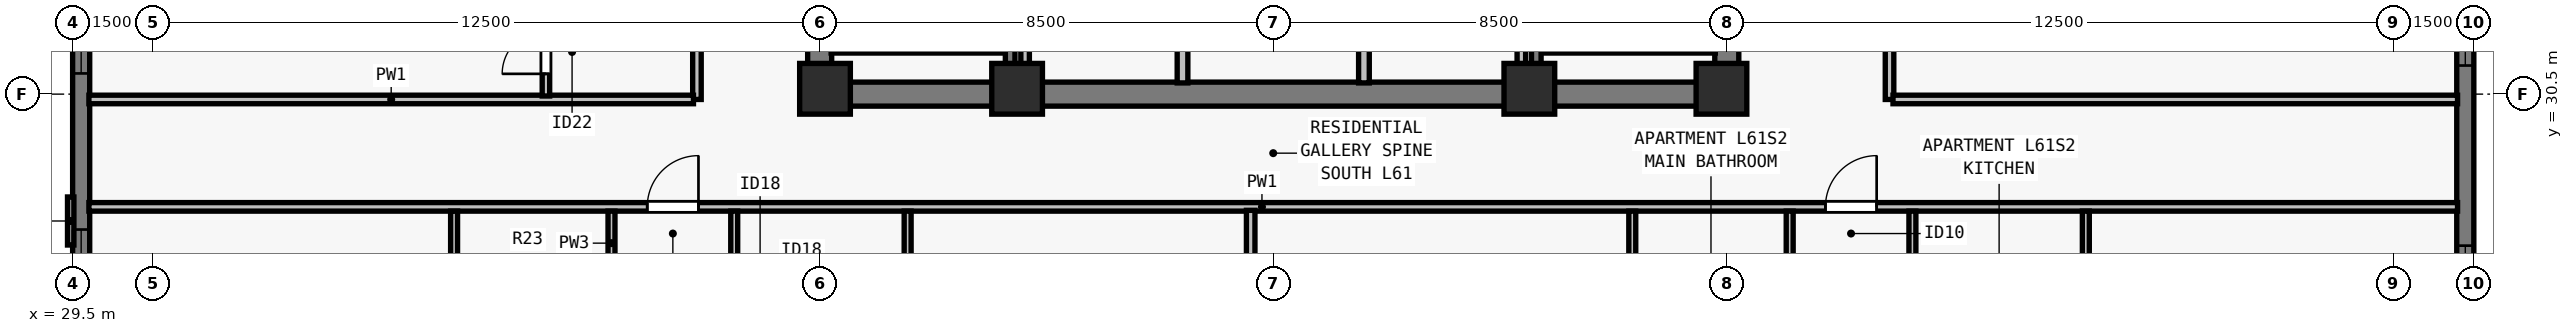
"""IFC4 building model, lengths in metres.
Left out: names, types, materials, properties, quantities, classifications, styles, units other than length and angle.
Written with IfcOpenShell. Run it as: python <this file> out.ifc"""

import sys

from ifc_helpers import new_model, si_unit, direction, frame, frame_2d, origin, origin_2d, place, context, subcontext, project, spatial, rectangle, extrude, element, fill, save


model = new_model("IFC4")
c1 = context("Model", 3, precision=1e-05, world=origin(), true_north=direction((0.0, 1.0)))
c2 = subcontext(c1, "Body", "Model", "MODEL_VIEW")
j1 = project(units=[si_unit("LENGTHUNIT", "METRE"), si_unit("PLANEANGLEUNIT", "RADIAN")], contexts=[c1])
p1 = place(None, origin())
s1 = spatial("IfcSite", under=j1, at=p1, CompositionType="ELEMENT")
p2 = place(p1, origin())
s2 = spatial("IfcBuilding", under=s1, at=p2, CompositionType="ELEMENT")
p3 = place(p2, frame((0.0, 0.0, 223.5)))
s3 = spatial("IfcBuildingStorey", under=s2, at=p3, CompositionType="ELEMENT", Elevation=223.5)
for number, where, z_axis, x_axis in (
    (1, (43.6, 30.6, 0.0), (0.0, 0.0, 1.0), (1.0, 0.0, 0.0)),
    (2, (47.2, 30.6, 0.0), (0.0, 0.0, 1.0), (1.0, 0.0, 0.0)),
    (3, (56.8, 30.6, 0.0), (0.0, 0.0, 1.0), (1.0, 0.0, 0.0)),
    (4, (60.4, 30.6, 0.0), (0.0, 0.0, 1.0), (1.0, 0.0, 0.0)),
):
    element("IfcColumn", number, at=place(p3, frame(where, z_axis=z_axis, x_axis=x_axis)), inside=s3, PredefinedType="COLUMN", context=c2, shape_type="SweptSolid", body=[
        extrude(rectangle(XDim=0.95, YDim=0.95, at=origin_2d()), origin(), (0.0, 0.0, 1.0), 3.5),
    ])
p4 = place(p3, frame((74.34, 56.5, 0.0), z_axis=(0.0, 0.0, 1.0), x_axis=(0.0, -1.0, 0.0)))
e5 = element("IfcWall", 5, at=p4, inside=s3, PredefinedType="SOLIDWALL", context=c2, shape_type="SweptSolid", body=[
    extrude(rectangle(XDim=34.702, YDim=0.32, at=frame_2d((17.351, 0.0))), origin(), (0.0, 0.0, 1.0), 3.29),
])
p5 = place(p4, frame((4.613, 0.0, 0.8)))
e6 = element("IfcOpeningElement", 6, at=p5, cuts=e5, PredefinedType="OPENING", context=c2, shape_type="SweptSolid", body=[
    extrude(rectangle(XDim=1.85, YDim=1.678, at=frame_2d((0.925, 0.839))), frame((0.0, 0.17, 0.0), z_axis=(0.0, -1.0, 0.0), x_axis=(1.0, 0.0, 0.0)), (0.0, 0.0, 1.0), 0.34),
])
p6 = place(p4, frame((9.388, 0.0, 0.8)))
e7 = element("IfcOpeningElement", 7, at=p6, cuts=e5, PredefinedType="OPENING", context=c2, shape_type="SweptSolid", body=[
    extrude(rectangle(XDim=1.55, YDim=1.678, at=frame_2d((0.775, 0.839))), frame((0.0, 0.17, 0.0), z_axis=(0.0, -1.0, 0.0), x_axis=(1.0, 0.0, 0.0)), (0.0, 0.0, 1.0), 0.34),
])
p7 = place(p4, frame((14.888, 0.0, 0.8)))
e8 = element("IfcOpeningElement", 8, at=p7, cuts=e5, PredefinedType="OPENING", context=c2, shape_type="SweptSolid", body=[
    extrude(rectangle(XDim=1.55, YDim=1.678, at=frame_2d((0.775, 0.839))), frame((0.0, 0.17, 0.0), z_axis=(0.0, -1.0, 0.0), x_axis=(1.0, 0.0, 0.0)), (0.0, 0.0, 1.0), 0.34),
])
p8 = place(p4, frame((18.114, 0.0, 0.8)))
e9 = element("IfcOpeningElement", 9, at=p8, cuts=e5, PredefinedType="OPENING", context=c2, shape_type="SweptSolid", body=[
    extrude(rectangle(XDim=1.85, YDim=1.678, at=frame_2d((0.925, 0.839))), frame((0.0, 0.17, 0.0), z_axis=(0.0, -1.0, 0.0), x_axis=(1.0, 0.0, 0.0)), (0.0, 0.0, 1.0), 0.34),
])
p9 = place(p4, frame((23.614, 0.0, 0.8)))
e10 = element("IfcOpeningElement", 10, at=p9, cuts=e5, PredefinedType="OPENING", context=c2, shape_type="SweptSolid", body=[
    extrude(rectangle(XDim=1.85, YDim=1.678, at=frame_2d((0.925, 0.839))), frame((0.0, 0.17, 0.0), z_axis=(0.0, -1.0, 0.0), x_axis=(1.0, 0.0, 0.0)), (0.0, 0.0, 1.0), 0.34),
])
p10 = place(p4, frame((28.839, 0.0, 0.8)))
e11 = element("IfcOpeningElement", 11, at=p10, cuts=e5, PredefinedType="OPENING", context=c2, shape_type="SweptSolid", body=[
    extrude(rectangle(XDim=1.55, YDim=1.678, at=frame_2d((0.775, 0.839))), frame((0.0, 0.17, 0.0), z_axis=(0.0, -1.0, 0.0), x_axis=(1.0, 0.0, 0.0)), (0.0, 0.0, 1.0), 0.34),
])
p11 = place(p4, frame((31.35, 0.0, 0.8)))
e12 = element("IfcOpeningElement", 12, at=p11, cuts=e5, PredefinedType="OPENING", context=c2, shape_type="SweptSolid", body=[
    extrude(rectangle(XDim=0.9, YDim=1.678, at=frame_2d((0.45, 0.839))), frame((0.0, 0.17, 0.0), z_axis=(0.0, -1.0, 0.0), x_axis=(1.0, 0.0, 0.0)), (0.0, 0.0, 1.0), 0.34),
])
p12 = place(p3, frame((29.66, 21.5, 0.0), z_axis=(0.0, 0.0, 1.0), x_axis=(0.0, 1.0, 0.0)))
e13 = element("IfcWall", 13, at=p12, inside=s3, PredefinedType="SOLIDWALL", context=c2, shape_type="SweptSolid", body=[
    extrude(rectangle(XDim=34.702, YDim=0.32, at=frame_2d((17.351, 0.0))), origin(), (0.0, 0.0, 1.0), 3.29),
])
p13 = place(p12, frame((4.613, 0.0, 0.8)))
e14 = element("IfcOpeningElement", 14, at=p13, cuts=e13, PredefinedType="OPENING", context=c2, shape_type="SweptSolid", body=[
    extrude(rectangle(XDim=1.85, YDim=1.678, at=frame_2d((0.925, 0.839))), frame((0.0, 0.17, 0.0), z_axis=(0.0, -1.0, 0.0), x_axis=(1.0, 0.0, 0.0)), (0.0, 0.0, 1.0), 0.34),
])
p14 = place(p12, frame((9.388, 0.0, 0.8)))
e15 = element("IfcOpeningElement", 15, at=p14, cuts=e13, PredefinedType="OPENING", context=c2, shape_type="SweptSolid", body=[
    extrude(rectangle(XDim=1.55, YDim=1.678, at=frame_2d((0.775, 0.839))), frame((0.0, 0.17, 0.0), z_axis=(0.0, -1.0, 0.0), x_axis=(1.0, 0.0, 0.0)), (0.0, 0.0, 1.0), 0.34),
])
p15 = place(p12, frame((14.888, 0.0, 0.8)))
e16 = element("IfcOpeningElement", 16, at=p15, cuts=e13, PredefinedType="OPENING", context=c2, shape_type="SweptSolid", body=[
    extrude(rectangle(XDim=1.55, YDim=1.678, at=frame_2d((0.775, 0.839))), frame((0.0, 0.17, 0.0), z_axis=(0.0, -1.0, 0.0), x_axis=(1.0, 0.0, 0.0)), (0.0, 0.0, 1.0), 0.34),
])
p16 = place(p12, frame((19.364, 0.0, 0.8)))
e17 = element("IfcOpeningElement", 17, at=p16, cuts=e13, PredefinedType="OPENING", context=c2, shape_type="SweptSolid", body=[
    extrude(rectangle(XDim=1.85, YDim=1.678, at=frame_2d((0.925, 0.839))), frame((0.0, 0.17, 0.0), z_axis=(0.0, -1.0, 0.0), x_axis=(1.0, 0.0, 0.0)), (0.0, 0.0, 1.0), 0.34),
])
p17 = place(p12, frame((23.614, 0.0, 0.8)))
e18 = element("IfcOpeningElement", 18, at=p17, cuts=e13, PredefinedType="OPENING", context=c2, shape_type="SweptSolid", body=[
    extrude(rectangle(XDim=1.85, YDim=1.678, at=frame_2d((0.925, 0.839))), frame((0.0, 0.17, 0.0), z_axis=(0.0, -1.0, 0.0), x_axis=(1.0, 0.0, 0.0)), (0.0, 0.0, 1.0), 0.34),
])
p18 = place(p12, frame((28.839, 0.0, 0.8)))
e19 = element("IfcOpeningElement", 19, at=p18, cuts=e13, PredefinedType="OPENING", context=c2, shape_type="SweptSolid", body=[
    extrude(rectangle(XDim=1.55, YDim=1.678, at=frame_2d((0.775, 0.839))), frame((0.0, 0.17, 0.0), z_axis=(0.0, -1.0, 0.0), x_axis=(1.0, 0.0, 0.0)), (0.0, 0.0, 1.0), 0.34),
])
p19 = place(p12, frame((31.35, 0.0, 0.8)))
e20 = element("IfcOpeningElement", 20, at=p19, cuts=e13, PredefinedType="OPENING", context=c2, shape_type="SweptSolid", body=[
    extrude(rectangle(XDim=0.9, YDim=1.678, at=frame_2d((0.45, 0.839))), frame((0.0, 0.17, 0.0), z_axis=(0.0, -1.0, 0.0), x_axis=(1.0, 0.0, 0.0)), (0.0, 0.0, 1.0), 0.34),
])
p20 = place(p3, frame((43.275, 30.5, 0.0), z_axis=(0.0, 0.0, 1.0), x_axis=(1.0, 0.0, 0.0)))
e21 = element("IfcWall", 21, at=p20, inside=s3, PredefinedType="SHEAR", context=c2, shape_type="SweptSolid", body=[
    extrude(rectangle(XDim=17.45, YDim=0.45, at=frame_2d((8.725, 0.0))), origin(), (0.0, 0.0, 1.0), 3.29),
])
for number, where, z_axis, x_axis in (
    (22, (43.5, 30.715, 0.0), (0.0, 0.0, 1.0), (0.0, 1.0, 0.0)),
    (23, (60.5, 30.715, 0.0), (0.0, 0.0, 1.0), (0.0, 1.0, 0.0)),
):
    element("IfcWall", number, at=place(p3, frame(where, z_axis=z_axis, x_axis=x_axis)), inside=s3, PredefinedType="SHEAR", context=c2, shape_type="SweptSolid", body=[
        extrude(rectangle(XDim=8.035, YDim=0.45, at=frame_2d((4.018, 0.0))), origin(), (0.0, 0.0, 1.0), 3.29),
    ])
p21 = place(p3, frame((50.3, 30.71, 0.0), z_axis=(0.0, 0.0, 1.0), x_axis=(0.0, 1.0, 0.0)))
e24 = element("IfcWall", 24, at=p21, inside=s3, PredefinedType="SOLIDWALL", context=c2, shape_type="SweptSolid", body=[
    extrude(rectangle(XDim=7.905, YDim=0.2, at=frame_2d((3.953, 0.0))), origin(), (0.0, 0.0, 1.0), 3.29),
])
p22 = place(p21, frame((3.34, 0.0, 0.0)))
e25 = element("IfcOpeningElement", 25, at=p22, cuts=e24, PredefinedType="OPENING", context=c2, shape_type="SweptSolid", body=[
    extrude(rectangle(XDim=0.9, YDim=2.12, at=frame_2d((0.45, 1.06))), frame((0.0, 0.11, 0.0), z_axis=(0.0, -1.0, 0.0), x_axis=(1.0, 0.0, 0.0)), (0.0, 0.0, 1.0), 0.22),
])
p23 = place(p3, frame((53.7, 30.71, 0.0), z_axis=(0.0, 0.0, 1.0), x_axis=(0.0, 1.0, 0.0)))
e26 = element("IfcWall", 26, at=p23, inside=s3, PredefinedType="SOLIDWALL", context=c2, shape_type="SweptSolid", body=[
    extrude(rectangle(XDim=7.905, YDim=0.2, at=frame_2d((3.953, 0.0))), origin(), (0.0, 0.0, 1.0), 3.29),
])
p24 = place(p23, frame((3.14, 0.0, 0.0)))
e27 = element("IfcOpeningElement", 27, at=p24, cuts=e26, PredefinedType="OPENING", context=c2, shape_type="SweptSolid", body=[
    extrude(rectangle(XDim=0.9, YDim=2.12, at=frame_2d((0.45, 1.06))), frame((0.0, 0.11, 0.0), z_axis=(0.0, -1.0, 0.0), x_axis=(1.0, 0.0, 0.0)), (0.0, 0.0, 1.0), 0.22),
])
for number, where, z_axis, x_axis in (
    (28, (47.35, 30.71, 0.0), (0.0, 0.0, 1.0), (0.0, 1.0, 0.0)),
    (29, (56.65, 30.71, 0.0), (0.0, 0.0, 1.0), (0.0, 1.0, 0.0)),
):
    element("IfcWall", number, at=place(p3, frame(where, z_axis=z_axis, x_axis=x_axis)), inside=s3, PredefinedType="PARTITIONING", context=c2, shape_type="SweptSolid", body=[
        extrude(rectangle(XDim=7.905, YDim=0.16, at=frame_2d((3.953, 0.0))), origin(), (0.0, 0.0, 1.0), 3.29),
    ])
p25 = place(p3, frame((29.805, 28.387, 0.0), z_axis=(0.0, 0.0, 1.0), x_axis=(1.0, 0.0, 0.0)))
e30 = element("IfcWall", 30, at=p25, inside=s3, PredefinedType="PARTITIONING", context=c2, shape_type="SweptSolid", body=[
    extrude(rectangle(XDim=44.39, YDim=0.16, at=frame_2d((22.195, 0.0))), origin(), (0.0, 0.0, 1.0), 2.958),
])
p26 = place(p25, frame((10.464, 0.0, 0.0)))
e31 = element("IfcOpeningElement", 31, at=p26, cuts=e30, PredefinedType="OPENING", context=c2, shape_type="SweptSolid", body=[
    extrude(rectangle(XDim=0.96, YDim=2.18, at=frame_2d((0.48, 1.09))), frame((0.0, 0.09, 0.0), z_axis=(0.0, -1.0, 0.0), x_axis=(1.0, 0.0, 0.0)), (0.0, 0.0, 1.0), 0.18),
])
p27 = place(p25, frame((32.544, 0.0, 0.0)))
e32 = element("IfcOpeningElement", 32, at=p27, cuts=e30, PredefinedType="OPENING", context=c2, shape_type="SweptSolid", body=[
    extrude(rectangle(XDim=0.96, YDim=2.18, at=frame_2d((0.48, 1.09))), frame((0.0, 0.09, 0.0), z_axis=(0.0, -1.0, 0.0), x_axis=(1.0, 0.0, 0.0)), (0.0, 0.0, 1.0), 0.18),
])
p28 = place(p3, frame((41.2, 30.4, 0.0), z_axis=(0.0, 0.0, 1.0), x_axis=(0.0, 1.0, 0.0)))
e33 = element("IfcWall", 33, at=p28, inside=s3, PredefinedType="PARTITIONING", context=c2, shape_type="SweptSolid", body=[
    extrude(rectangle(XDim=17.2, YDim=0.16, at=frame_2d((8.6, 0.0))), origin(), (0.0, 0.0, 1.0), 3.29),
])
p29 = place(p28, frame((8.12, 0.0, 0.0)))
e34 = element("IfcOpeningElement", 34, at=p29, cuts=e33, PredefinedType="OPENING", context=c2, shape_type="SweptSolid", body=[
    extrude(rectangle(XDim=0.96, YDim=2.18, at=frame_2d((0.48, 1.09))), frame((0.0, 0.09, 0.0), z_axis=(0.0, -1.0, 0.0), x_axis=(1.0, 0.0, 0.0)), (0.0, 0.0, 1.0), 0.18),
])
p30 = place(p3, frame((63.55, 30.4, 0.0), z_axis=(0.0, 0.0, 1.0), x_axis=(0.0, 1.0, 0.0)))
e35 = element("IfcWall", 35, at=p30, inside=s3, PredefinedType="PARTITIONING", context=c2, shape_type="SweptSolid", body=[
    extrude(rectangle(XDim=17.2, YDim=0.16, at=frame_2d((8.6, 0.0))), origin(), (0.0, 0.0, 1.0), 3.29),
])
p31 = place(p30, frame((3.6, 0.0, 0.0)))
e36 = element("IfcOpeningElement", 36, at=p31, cuts=e35, PredefinedType="OPENING", context=c2, shape_type="SweptSolid", body=[
    extrude(rectangle(XDim=0.96, YDim=2.12, at=frame_2d((0.48, 1.06))), frame((0.0, 0.09, 0.0), z_axis=(0.0, -1.0, 0.0), x_axis=(1.0, 0.0, 0.0)), (0.0, 0.0, 1.0), 0.18),
])
p32 = place(p30, frame((12.44, 0.0, 0.0)))
e37 = element("IfcOpeningElement", 37, at=p32, cuts=e35, PredefinedType="OPENING", context=c2, shape_type="SweptSolid", body=[
    extrude(rectangle(XDim=0.96, YDim=2.18, at=frame_2d((0.48, 1.09))), frame((0.0, 0.09, 0.0), z_axis=(0.0, -1.0, 0.0), x_axis=(1.0, 0.0, 0.0)), (0.0, 0.0, 1.0), 0.18),
])
p33 = place(p3, frame((29.805, 30.4, 0.0), z_axis=(0.0, 0.0, 1.0), x_axis=(1.0, 0.0, 0.0)))
e38 = element("IfcWall", 38, at=p33, inside=s3, PredefinedType="PARTITIONING", context=c2, shape_type="SweptSolid", body=[
    extrude(rectangle(XDim=11.33, YDim=0.16, at=frame_2d((5.665, 0.0))), origin(), (0.0, 0.0, 1.0), 3.29),
])
p34 = place(p3, frame((63.615, 30.4, 0.0), z_axis=(0.0, 0.0, 1.0), x_axis=(1.0, 0.0, 0.0)))
e39 = element("IfcWall", 39, at=p34, inside=s3, PredefinedType="PARTITIONING", context=c2, shape_type="SweptSolid", body=[
    extrude(rectangle(XDim=10.58, YDim=0.16, at=frame_2d((5.29, 0.0))), origin(), (0.0, 0.0, 1.0), 3.29),
])
p35 = place(p3, frame((36.649, 25.558, 0.0), z_axis=(0.0, 0.0, 1.0), x_axis=(0.0, 1.0, 0.0)))
e40 = element("IfcWall", 40, at=p35, inside=s3, PredefinedType="PLUMBINGWALL", context=c2, shape_type="SweptSolid", body=[
    extrude(rectangle(XDim=2.75, YDim=0.13, at=frame_2d((1.375, 0.0))), origin(), (0.0, 0.0, 1.0), 3.29),
])
p36 = place(p3, frame((39.599, 25.558, 0.0), z_axis=(0.0, 0.0, 1.0), x_axis=(0.0, 1.0, 0.0)))
e41 = element("IfcWall", 41, at=p36, inside=s3, PredefinedType="PLUMBINGWALL", context=c2, shape_type="SweptSolid", body=[
    extrude(rectangle(XDim=2.75, YDim=0.13, at=frame_2d((1.375, 0.0))), origin(), (0.0, 0.0, 1.0), 3.29),
])
p37 = place(p36, frame((0.55, 0.0, 0.0)))
e42 = element("IfcOpeningElement", 42, at=p37, cuts=e41, PredefinedType="OPENING", context=c2, shape_type="SweptSolid", body=[
    extrude(rectangle(XDim=0.85, YDim=2.08, at=frame_2d((0.425, 1.04))), frame((0.0, 0.075, 0.0), z_axis=(0.0, -1.0, 0.0), x_axis=(1.0, 0.0, 0.0)), (0.0, 0.0, 1.0), 0.15),
])
p38 = place(p3, frame((45.149, 25.558, 0.0), z_axis=(0.0, 0.0, 1.0), x_axis=(0.0, 1.0, 0.0)))
e43 = element("IfcWall", 43, at=p38, inside=s3, PredefinedType="PLUMBINGWALL", context=c2, shape_type="SweptSolid", body=[
    extrude(rectangle(XDim=2.75, YDim=0.13, at=frame_2d((1.375, 0.0))), origin(), (0.0, 0.0, 1.0), 3.29),
])
p39 = place(p3, frame((41.899, 25.558, 0.0), z_axis=(0.0, 0.0, 1.0), x_axis=(0.0, 1.0, 0.0)))
e44 = element("IfcWall", 44, at=p39, inside=s3, PredefinedType="PLUMBINGWALL", context=c2, shape_type="SweptSolid", body=[
    extrude(rectangle(XDim=2.75, YDim=0.13, at=frame_2d((1.375, 0.0))), origin(), (0.0, 0.0, 1.0), 2.573),
])
p40 = place(p39, frame((0.55, 0.0, 0.0)))
e45 = element("IfcOpeningElement", 45, at=p40, cuts=e44, PredefinedType="OPENING", context=c2, shape_type="SweptSolid", body=[
    extrude(rectangle(XDim=0.88, YDim=2.1, at=frame_2d((0.44, 1.05))), frame((0.0, 0.075, 0.0), z_axis=(0.0, -1.0, 0.0), x_axis=(1.0, 0.0, 0.0)), (0.0, 0.0, 1.0), 0.15),
])
p41 = place(p3, frame((51.577, 16.805, 0.0), z_axis=(0.0, 0.0, 1.0), x_axis=(0.0, 1.0, 0.0)))
e46 = element("IfcWall", 46, at=p41, inside=s3, PredefinedType="PARTITIONING", context=c2, shape_type="SweptSolid", body=[
    extrude(rectangle(XDim=11.518, YDim=0.16, at=frame_2d((5.759, 0.0))), origin(), (0.0, 0.0, 1.0), 2.958),
])
p42 = place(p3, frame((58.729, 25.558, 0.0), z_axis=(0.0, 0.0, 1.0), x_axis=(0.0, 1.0, 0.0)))
e47 = element("IfcWall", 47, at=p42, inside=s3, PredefinedType="PLUMBINGWALL", context=c2, shape_type="SweptSolid", body=[
    extrude(rectangle(XDim=2.75, YDim=0.13, at=frame_2d((1.375, 0.0))), origin(), (0.0, 0.0, 1.0), 3.29),
])
p43 = place(p3, frame((61.679, 25.558, 0.0), z_axis=(0.0, 0.0, 1.0), x_axis=(0.0, 1.0, 0.0)))
e48 = element("IfcWall", 48, at=p43, inside=s3, PredefinedType="PLUMBINGWALL", context=c2, shape_type="SweptSolid", body=[
    extrude(rectangle(XDim=2.75, YDim=0.13, at=frame_2d((1.375, 0.0))), origin(), (0.0, 0.0, 1.0), 3.29),
])
p44 = place(p43, frame((0.55, 0.0, 0.0)))
e49 = element("IfcOpeningElement", 49, at=p44, cuts=e48, PredefinedType="OPENING", context=c2, shape_type="SweptSolid", body=[
    extrude(rectangle(XDim=0.85, YDim=2.08, at=frame_2d((0.425, 1.04))), frame((0.0, 0.075, 0.0), z_axis=(0.0, -1.0, 0.0), x_axis=(1.0, 0.0, 0.0)), (0.0, 0.0, 1.0), 0.15),
])
p45 = place(p3, frame((67.229, 25.558, 0.0), z_axis=(0.0, 0.0, 1.0), x_axis=(0.0, 1.0, 0.0)))
e50 = element("IfcWall", 50, at=p45, inside=s3, PredefinedType="PLUMBINGWALL", context=c2, shape_type="SweptSolid", body=[
    extrude(rectangle(XDim=2.75, YDim=0.13, at=frame_2d((1.375, 0.0))), origin(), (0.0, 0.0, 1.0), 3.29),
])
p46 = place(p3, frame((63.979, 25.558, 0.0), z_axis=(0.0, 0.0, 1.0), x_axis=(0.0, 1.0, 0.0)))
e51 = element("IfcWall", 51, at=p46, inside=s3, PredefinedType="PLUMBINGWALL", context=c2, shape_type="SweptSolid", body=[
    extrude(rectangle(XDim=2.75, YDim=0.13, at=frame_2d((1.375, 0.0))), origin(), (0.0, 0.0, 1.0), 3.29),
])
p47 = place(p46, frame((0.55, 0.0, 0.0)))
e52 = element("IfcOpeningElement", 52, at=p47, cuts=e51, PredefinedType="OPENING", context=c2, shape_type="SweptSolid", body=[
    extrude(rectangle(XDim=0.88, YDim=2.1, at=frame_2d((0.44, 1.05))), frame((0.0, 0.075, 0.0), z_axis=(0.0, -1.0, 0.0), x_axis=(1.0, 0.0, 0.0)), (0.0, 0.0, 1.0), 0.15),
])
p48 = place(p3, frame((38.37, 30.465, 0.0), z_axis=(0.0, 0.0, 1.0), x_axis=(0.0, 1.0, 0.0)))
e53 = element("IfcWall", 53, at=p48, inside=s3, PredefinedType="PARTITIONING", context=c2, shape_type="SweptSolid", body=[
    extrude(rectangle(XDim=4.16, YDim=0.14, at=frame_2d((2.08, 0.0))), origin(), (0.0, 0.0, 1.0), 3.29),
])
p49 = place(p48, frame((0.415, 0.0, 0.0)))
e54 = element("IfcOpeningElement", 54, at=p49, cuts=e53, PredefinedType="OPENING", context=c2, shape_type="SweptSolid", body=[
    extrude(rectangle(XDim=0.82, YDim=2.1, at=frame_2d((0.41, 1.05))), frame((0.0, 0.08, 0.0), z_axis=(0.0, -1.0, 0.0), x_axis=(1.0, 0.0, 0.0)), (0.0, 0.0, 1.0), 0.16),
])
p50 = place(p3, frame((43.715, 31.36, 0.0), z_axis=(0.0, 0.0, 1.0), x_axis=(1.0, 0.0, 0.0)))
e55 = element("IfcWall", 55, at=p50, inside=s3, PredefinedType="SOLIDWALL", context=c2, shape_type="SweptSolid", body=[
    extrude(rectangle(XDim=3.28, YDim=0.18, at=frame_2d((1.64, 0.0))), origin(), (0.0, 0.0, 1.0), 3.29),
])
p51 = place(p3, frame((47.07, 38.78, 0.0), z_axis=(0.0, 0.0, 1.0), x_axis=(0.0, -1.0, 0.0)))
e56 = element("IfcWall", 56, at=p51, inside=s3, PredefinedType="SOLIDWALL", context=c2, shape_type="SweptSolid", body=[
    extrude(rectangle(XDim=8.067, YDim=0.18, at=frame_2d((4.034, 0.0))), origin(), (0.0, 0.0, 1.0), 3.29),
])
p52 = place(p3, frame((57.005, 31.36, 0.0), z_axis=(0.0, 0.0, 1.0), x_axis=(1.0, 0.0, 0.0)))
e57 = element("IfcWall", 57, at=p52, inside=s3, PredefinedType="SOLIDWALL", context=c2, shape_type="SweptSolid", body=[
    extrude(rectangle(XDim=3.28, YDim=0.18, at=frame_2d((1.64, 0.0))), origin(), (0.0, 0.0, 1.0), 3.29),
])
p53 = place(p3, frame((56.93, 38.78, 0.0), z_axis=(0.0, 0.0, 1.0), x_axis=(0.0, -1.0, 0.0)))
e58 = element("IfcWall", 58, at=p53, inside=s3, PredefinedType="SOLIDWALL", context=c2, shape_type="SweptSolid", body=[
    extrude(rectangle(XDim=8.067, YDim=0.18, at=frame_2d((4.034, 0.0))), origin(), (0.0, 0.0, 1.0), 3.29),
])
p54 = place(p9, origin())
e59 = element("IfcWindow", 59, at=p54, inside=s3, PartitioningType="SINGLE_PANEL", PredefinedType="WINDOW", context=c2, shape_type="SweptSolid", body=[
    extrude(rectangle(XDim=1.85, YDim=1.678, at=frame_2d((0.925, 0.839))), frame((0.0, -0.05, 0.0), z_axis=(0.0, -1.0, 0.0), x_axis=(1.0, 0.0, 0.0)), (0.0, 0.0, 1.0), 0.06),
])
fill(e10, e59)
p55 = place(p10, origin())
e60 = element("IfcWindow", 60, at=p55, inside=s3, PartitioningType="SINGLE_PANEL", PredefinedType="WINDOW", context=c2, shape_type="SweptSolid", body=[
    extrude(rectangle(XDim=1.55, YDim=1.678, at=frame_2d((0.775, 0.839))), frame((0.0, -0.05, 0.0), z_axis=(0.0, -1.0, 0.0), x_axis=(1.0, 0.0, 0.0)), (0.0, 0.0, 1.0), 0.06),
])
fill(e11, e60)
p56 = place(p13, origin())
e61 = element("IfcWindow", 61, at=p56, inside=s3, PartitioningType="SINGLE_PANEL", PredefinedType="WINDOW", context=c2, shape_type="SweptSolid", body=[
    extrude(rectangle(XDim=1.85, YDim=1.678, at=frame_2d((0.925, 0.839))), frame((0.0, -0.05, 0.0), z_axis=(0.0, -1.0, 0.0), x_axis=(1.0, 0.0, 0.0)), (0.0, 0.0, 1.0), 0.06),
])
fill(e14, e61)
p57 = place(p14, origin())
e62 = element("IfcWindow", 62, at=p57, inside=s3, PartitioningType="SINGLE_PANEL", PredefinedType="WINDOW", context=c2, shape_type="SweptSolid", body=[
    extrude(rectangle(XDim=1.55, YDim=1.678, at=frame_2d((0.775, 0.839))), frame((0.0, -0.05, 0.0), z_axis=(0.0, -1.0, 0.0), x_axis=(1.0, 0.0, 0.0)), (0.0, 0.0, 1.0), 0.06),
])
fill(e15, e62)
p58 = place(p26, origin())
e63 = element("IfcDoor", 63, at=p58, inside=s3, OperationType="SINGLE_SWING_RIGHT", PredefinedType="DOOR", context=c2, shape_type="SweptSolid", body=[
    extrude(rectangle(XDim=0.96, YDim=2.18, at=frame_2d((0.48, 1.09))), frame((0.0, 0.025, 0.0), z_axis=(0.0, -1.0, 0.0), x_axis=(1.0, 0.0, 0.0)), (0.0, 0.0, 1.0), 0.05),
])
fill(e31, e63)
p59 = place(p27, origin())
e64 = element("IfcDoor", 64, at=p59, inside=s3, OperationType="SINGLE_SWING_RIGHT", PredefinedType="DOOR", context=c2, shape_type="SweptSolid", body=[
    extrude(rectangle(XDim=0.96, YDim=2.18, at=frame_2d((0.48, 1.09))), frame((0.0, 0.025, 0.0), z_axis=(0.0, -1.0, 0.0), x_axis=(1.0, 0.0, 0.0)), (0.0, 0.0, 1.0), 0.05),
])
fill(e32, e64)
p60 = place(p49, origin())
e65 = element("IfcDoor", 65, at=p60, inside=s3, OperationType="SINGLE_SWING_LEFT", PredefinedType="DOOR", context=c2, shape_type="SweptSolid", body=[
    extrude(rectangle(XDim=0.82, YDim=2.1, at=frame_2d((0.41, 1.05))), frame((0.0, 0.025, 0.0), z_axis=(0.0, -1.0, 0.0), x_axis=(1.0, 0.0, 0.0)), (0.0, 0.0, 1.0), 0.05),
])
fill(e54, e65)
save(model, sys.argv[1])
